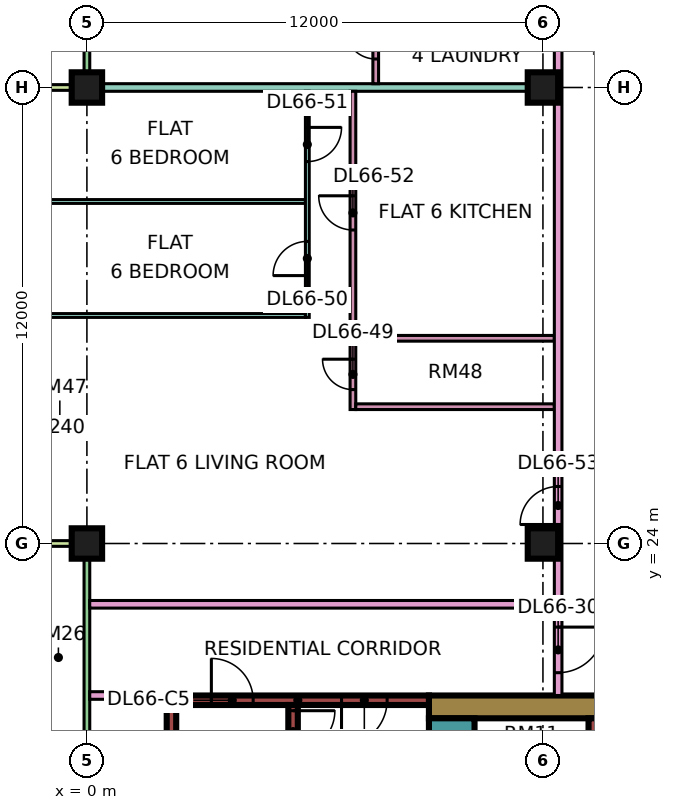
"""IFC4 building model, lengths in metres.
Left out: names, types, materials, properties, quantities, classifications, styles, units other than length and angle.
Written with IfcOpenShell. Run it as: python <this file> out.ifc"""

import sys

from ifc_helpers import new_model, si_unit, direction, frame, frame_2d, origin, origin_2d, place, context, subcontext, project, spatial, rectangle, extrude, element, fill, save


model = new_model("IFC4")
c1 = context("Model", 3, precision=1e-05, world=origin(), true_north=direction((0.0, 1.0)))
c2 = subcontext(c1, "Body", "Model", "MODEL_VIEW")
j1 = project(units=[si_unit("LENGTHUNIT", "METRE"), si_unit("PLANEANGLEUNIT", "RADIAN")], contexts=[c1])
p1 = place(None, origin())
s1 = spatial("IfcSite", under=j1, at=p1, CompositionType="ELEMENT")
p2 = place(p1, origin())
s2 = spatial("IfcBuilding", under=s1, at=p2, CompositionType="ELEMENT")
p3 = place(p2, frame((0.0, 0.0, 284.65)))
s3 = spatial("IfcBuildingStorey", under=s2, at=p3, CompositionType="ELEMENT", Elevation=284.65)
p4 = place(p3, frame((0.0, 24.0, 0.0), z_axis=(0.0, 0.0, 1.0), x_axis=(1.0, 0.0, 0.0)))
e1 = element("IfcColumn", 1, at=p4, inside=s3, PredefinedType="COLUMN", context=c2, shape_type="SweptSolid", body=[
    extrude(rectangle(XDim=0.8, YDim=0.8, at=origin_2d()), origin(), (0.0, 0.0, 1.0), 3.75),
])
p5 = place(p3, frame((0.0, 36.0, 0.0), z_axis=(0.0, 0.0, 1.0), x_axis=(1.0, 0.0, 0.0)))
e2 = element("IfcColumn", 2, at=p5, inside=s3, PredefinedType="COLUMN", context=c2, shape_type="SweptSolid", body=[
    extrude(rectangle(XDim=0.8, YDim=0.8, at=origin_2d()), origin(), (0.0, 0.0, 1.0), 3.75),
])
for number, where, z_axis, x_axis in (
    (3, (12.0, 24.0, 0.0), (0.0, 0.0, 1.0), (1.0, 0.0, 0.0)),
    (4, (12.0, 36.0, 0.0), (0.0, 0.0, 1.0), (1.0, 0.0, 0.0)),
):
    element("IfcColumn", number, at=place(p3, frame(where, z_axis=z_axis, x_axis=x_axis)), inside=s3, PredefinedType="COLUMN", context=c2, shape_type="SweptSolid", body=[
        extrude(rectangle(XDim=0.8, YDim=0.8, at=origin_2d()), origin(), (0.0, 0.0, 1.0), 3.75),
    ])
p6 = place(p3, frame((9.0, 19.7, 0.0), z_axis=(0.0, 0.0, 1.0), x_axis=(1.0, 0.0, 0.0)))
e5 = element("IfcWall", 5, at=p6, inside=s3, PredefinedType="SHEAR", context=c2, shape_type="SweptSolid", body=[
    extrude(rectangle(XDim=25.0, YDim=0.6, at=frame_2d((12.5, 0.0))), origin(), (0.0, 0.0, 1.0), 3.75),
])
p7 = place(p6, frame((19.1, 0.0, 0.0)))
e6 = element("IfcOpeningElement", 6, at=p7, cuts=e5, PredefinedType="OPENING", context=c2, shape_type="SweptSolid", body=[
    extrude(rectangle(XDim=1.8, YDim=2.4, at=frame_2d((0.9, 1.2))), frame((0.0, 0.31, 0.0), z_axis=(0.0, -1.0, 0.0), x_axis=(1.0, 0.0, 0.0)), (0.0, 0.0, 1.0), 0.62),
])
p8 = place(p3, frame((9.6, 7.6, 0.0), z_axis=(0.0, 0.0, 1.0), x_axis=(0.0, 1.0, 0.0)))
e7 = element("IfcWall", 7, at=p8, inside=s3, PredefinedType="SHEAR", context=c2, shape_type="SweptSolid", body=[
    extrude(rectangle(XDim=11.8, YDim=1.2, at=frame_2d((5.9, 0.0))), origin(), (0.0, 0.0, 1.0), 3.75),
])
p9 = place(p8, frame((4.275, 0.0, 0.0)))
e8 = element("IfcOpeningElement", 8, at=p9, cuts=e7, PredefinedType="OPENING", context=c2, shape_type="SweptSolid", body=[
    extrude(rectangle(XDim=1.1, YDim=2.2, at=frame_2d((0.55, 1.1))), frame((0.0, 0.61, 0.0), z_axis=(0.0, -1.0, 0.0), x_axis=(1.0, 0.0, 0.0)), (0.0, 0.0, 1.0), 1.22),
])
p10 = place(p8, frame((6.775, 0.0, 0.0)))
e9 = element("IfcOpeningElement", 9, at=p10, cuts=e7, PredefinedType="OPENING", context=c2, shape_type="SweptSolid", body=[
    extrude(rectangle(XDim=1.1, YDim=2.2, at=frame_2d((0.55, 1.1))), frame((0.0, 0.61, 0.0), z_axis=(0.0, -1.0, 0.0), x_axis=(1.0, 0.0, 0.0)), (0.0, 0.0, 1.0), 1.22),
])
p11 = place(p8, frame((9.7, 0.0, 0.0)))
e10 = element("IfcOpeningElement", 10, at=p11, cuts=e7, PredefinedType="OPENING", context=c2, shape_type="SweptSolid", body=[
    extrude(rectangle(XDim=1.1, YDim=2.2, at=frame_2d((0.55, 1.1))), frame((0.0, 0.61, 0.0), z_axis=(0.0, -1.0, 0.0), x_axis=(1.0, 0.0, 0.0)), (0.0, 0.0, 1.0), 1.22),
])
p12 = place(p8, frame((1.95, 0.0, 0.0)))
e11 = element("IfcOpeningElement", 11, at=p12, cuts=e7, PredefinedType="OPENING", context=c2, shape_type="SweptSolid", body=[
    extrude(rectangle(XDim=0.9, YDim=2.1, at=frame_2d((0.45, 1.05))), frame((0.0, 0.61, 0.0), z_axis=(0.0, -1.0, 0.0), x_axis=(1.0, 0.0, 0.0)), (0.0, 0.0, 1.0), 1.22),
])
p13 = place(p3, frame((13.325, 7.6, 0.0), z_axis=(0.0, 0.0, 1.0), x_axis=(0.0, 1.0, 0.0)))
e12 = element("IfcWall", 12, at=p13, inside=s3, PredefinedType="SHEAR", context=c2, shape_type="SweptSolid", body=[
    extrude(rectangle(XDim=11.8, YDim=0.25, at=frame_2d((5.9, 0.0))), origin(), (0.0, 0.0, 1.0), 3.75),
])
p14 = place(p3, frame((2.1, 19.875, 0.0), z_axis=(0.0, 0.0, 1.0), x_axis=(1.0, 0.0, 0.0)))
e13 = element("IfcWall", 13, at=p14, inside=s3, PredefinedType="SHEAR", context=c2, shape_type="SweptSolid", body=[
    extrude(rectangle(XDim=6.9, YDim=0.25, at=frame_2d((3.45, 0.0))), origin(), (0.0, 0.0, 1.0), 3.75),
])
p15 = place(p14, frame((1.175, 0.0, 0.0)))
e14 = element("IfcOpeningElement", 14, at=p15, cuts=e13, PredefinedType="OPENING", context=c2, shape_type="SweptSolid", body=[
    extrude(rectangle(XDim=1.1, YDim=2.2, at=frame_2d((0.55, 1.1))), frame((0.0, 0.135, 0.0), z_axis=(0.0, -1.0, 0.0), x_axis=(1.0, 0.0, 0.0)), (0.0, 0.0, 1.0), 0.27),
])
p16 = place(p14, frame((4.6, 0.0, 0.0)))
e15 = element("IfcOpeningElement", 15, at=p16, cuts=e13, PredefinedType="OPENING", context=c2, shape_type="SweptSolid", body=[
    extrude(rectangle(XDim=1.2, YDim=2.2, at=frame_2d((0.6, 1.1))), frame((0.0, 0.135, 0.0), z_axis=(0.0, -1.0, 0.0), x_axis=(1.0, 0.0, 0.0)), (0.0, 0.0, 1.0), 0.27),
])
p17 = place(p3, frame((2.225, 13.25, 0.0), z_axis=(0.0, 0.0, 1.0), x_axis=(0.0, 1.0, 0.0)))
e16 = element("IfcWall", 16, at=p17, inside=s3, PredefinedType="SHEAR", context=c2, shape_type="SweptSolid", body=[
    extrude(rectangle(XDim=6.5, YDim=0.25, at=frame_2d((3.25, 0.0))), origin(), (0.0, 0.0, 1.0), 3.75),
])
p18 = place(p3, frame((5.425, 13.25, 0.0), z_axis=(0.0, 0.0, 1.0), x_axis=(0.0, 1.0, 0.0)))
e17 = element("IfcWall", 17, at=p18, inside=s3, PredefinedType="SHEAR", context=c2, shape_type="SweptSolid", body=[
    extrude(rectangle(XDim=6.5, YDim=0.25, at=frame_2d((3.25, 0.0))), origin(), (0.0, 0.0, 1.0), 3.75),
])
p19 = place(p18, frame((5.25, 0.0, 0.0)))
e18 = element("IfcOpeningElement", 18, at=p19, cuts=e17, PredefinedType="OPENING", context=c2, shape_type="SweptSolid", body=[
    extrude(rectangle(XDim=1.1, YDim=2.2, at=frame_2d((0.55, 1.1))), frame((0.0, 0.135, 0.0), z_axis=(0.0, -1.0, 0.0), x_axis=(1.0, 0.0, 0.0)), (0.0, 0.0, 1.0), 0.27),
])
p20 = place(p3, frame((0.0, 47.925, 0.0), z_axis=(0.0, 0.0, 1.0), x_axis=(0.0, -1.0, 0.0)))
e19 = element("IfcWall", 19, at=p20, inside=s3, PredefinedType="SOLIDWALL", context=c2, shape_type="SweptSolid", body=[
    extrude(rectangle(XDim=11.85, YDim=0.15, at=frame_2d((5.925, 0.0))), origin(), (0.0, 0.0, 1.0), 3.35),
])
p21 = place(p20, frame((0.613, 0.0, 0.0)))
e20 = element("IfcOpeningElement", 20, at=p21, cuts=e19, PredefinedType="OPENING", context=c2, shape_type="SweptSolid", body=[
    extrude(rectangle(XDim=1.2, YDim=2.4, at=frame_2d((0.6, 1.2))), frame((0.0, 0.085, 0.0), z_axis=(0.0, -1.0, 0.0), x_axis=(1.0, 0.0, 0.0)), (0.0, 0.0, 1.0), 0.17),
])
p22 = place(p20, frame((3.775, 0.0, 0.45)))
e21 = element("IfcOpeningElement", 21, at=p22, cuts=e19, PredefinedType="OPENING", context=c2, shape_type="SweptSolid", body=[
    extrude(rectangle(XDim=1.8, YDim=2.4, at=frame_2d((0.9, 1.2))), frame((0.0, 0.085, 0.0), z_axis=(0.0, -1.0, 0.0), x_axis=(1.0, 0.0, 0.0)), (0.0, 0.0, 1.0), 0.17),
])
p23 = place(p20, frame((7.175, 0.0, 0.45)))
e22 = element("IfcOpeningElement", 22, at=p23, cuts=e19, PredefinedType="OPENING", context=c2, shape_type="SweptSolid", body=[
    extrude(rectangle(XDim=3.0, YDim=2.4, at=frame_2d((1.5, 1.2))), frame((0.0, 0.085, 0.0), z_axis=(0.0, -1.0, 0.0), x_axis=(1.0, 0.0, 0.0)), (0.0, 0.0, 1.0), 0.17),
])
p24 = place(p3, frame((-1.5, 36.0, 0.0), z_axis=(0.0, 0.0, 1.0), x_axis=(1.0, 0.0, 0.0)))
e23 = element("IfcWall", 23, at=p24, inside=s3, PredefinedType="SOLIDWALL", context=c2, shape_type="SweptSolid", body=[
    extrude(rectangle(XDim=1.5, YDim=0.15, at=frame_2d((0.75, 0.0))), origin(), (0.0, 0.0, 1.0), 3.35),
])
p25 = place(p3, frame((0.0, 23.925, 0.0), z_axis=(0.0, 0.0, 1.0), x_axis=(0.0, -1.0, 0.0)))
e24 = element("IfcWall", 24, at=p25, inside=s3, PredefinedType="SOLIDWALL", context=c2, shape_type="SweptSolid", body=[
    extrude(rectangle(XDim=11.35, YDim=0.15, at=frame_2d((5.675, 0.0))), origin(), (0.0, 0.0, 1.0), 3.35),
])
p26 = place(p25, frame((6.738, 0.0, 0.0)))
e25 = element("IfcOpeningElement", 25, at=p26, cuts=e24, PredefinedType="OPENING", context=c2, shape_type="SweptSolid", body=[
    extrude(rectangle(XDim=1.8, YDim=2.4, at=frame_2d((0.9, 1.2))), frame((0.0, 0.085, 0.0), z_axis=(0.0, -1.0, 0.0), x_axis=(1.0, 0.0, 0.0)), (0.0, 0.0, 1.0), 0.17),
])
p27 = place(p3, frame((-1.5, 24.0, 0.0), z_axis=(0.0, 0.0, 1.0), x_axis=(1.0, 0.0, 0.0)))
e26 = element("IfcWall", 26, at=p27, inside=s3, PredefinedType="SOLIDWALL", context=c2, shape_type="SweptSolid", body=[
    extrude(rectangle(XDim=1.5, YDim=0.15, at=frame_2d((0.75, 0.0))), origin(), (0.0, 0.0, 1.0), 3.35),
])
p28 = place(p3, frame((-1.351, 33.0, 0.0), z_axis=(0.0, 0.0, 1.0), x_axis=(1.0, 0.0, 0.0)))
e27 = element("IfcWall", 27, at=p28, inside=s3, PredefinedType="PARTITIONING", context=c2, shape_type="SweptSolid", body=[
    extrude(rectangle(XDim=7.101, YDim=0.1, at=frame_2d((3.551, 0.0))), origin(), (0.0, 0.0, 1.0), 3.35),
])
p29 = place(p3, frame((-1.35, 30.0, 0.0), z_axis=(0.0, 0.0, 1.0), x_axis=(1.0, 0.0, 0.0)))
e28 = element("IfcWall", 28, at=p29, inside=s3, PredefinedType="PARTITIONING", context=c2, shape_type="SweptSolid", body=[
    extrude(rectangle(XDim=7.1, YDim=0.1, at=frame_2d((3.55, 0.0))), origin(), (0.0, 0.0, 1.0), 3.35),
])
e29 = element("IfcWall", 29, at=p5, inside=s3, PredefinedType="PARTITIONING", context=c2, shape_type="SweptSolid", body=[
    extrude(rectangle(XDim=12.3, YDim=0.2, at=frame_2d((6.15, 0.0))), origin(), (0.0, 0.0, 1.0), 3.35),
])
p30 = place(p3, frame((0.074, 20.0, 0.0), z_axis=(0.0, 0.0, 1.0), x_axis=(1.0, 0.0, 0.0)))
e30 = element("IfcWall", 30, at=p30, inside=s3, PredefinedType="PARTITIONING", context=c2, shape_type="SweptSolid", body=[
    extrude(rectangle(XDim=2.026, YDim=0.2, at=frame_2d((1.013, 0.0))), origin(), (0.0, 0.0, 1.0), 3.35),
])
p31 = place(p3, frame((0.074, 22.4, 0.0), z_axis=(0.0, 0.0, 1.0), x_axis=(1.0, 0.0, 0.0)))
e31 = element("IfcWall", 31, at=p31, inside=s3, PredefinedType="PARTITIONING", context=c2, shape_type="SweptSolid", body=[
    extrude(rectangle(XDim=12.226, YDim=0.2, at=frame_2d((6.113, 0.0))), origin(), (0.0, 0.0, 1.0), 3.35),
])
p32 = place(p3, frame((5.8, 29.95, 0.0), z_axis=(0.0, 0.0, 1.0), x_axis=(0.0, 1.0, 0.0)))
e32 = element("IfcWall", 32, at=p32, inside=s3, PredefinedType="PARTITIONING", context=c2, shape_type="SweptSolid", body=[
    extrude(rectangle(XDim=5.95, YDim=0.1, at=frame_2d((2.975, 0.0))), origin(), (0.0, 0.0, 1.0), 3.35),
])
p33 = place(p32, frame((1.1, 0.0, 0.0)))
e33 = element("IfcOpeningElement", 33, at=p33, cuts=e32, PredefinedType="OPENING", context=c2, shape_type="SweptSolid", body=[
    extrude(rectangle(XDim=0.9, YDim=2.1, at=frame_2d((0.45, 1.05))), frame((0.0, 0.06, 0.0), z_axis=(0.0, -1.0, 0.0), x_axis=(1.0, 0.0, 0.0)), (0.0, 0.0, 1.0), 0.12),
])
p34 = place(p32, frame((4.1, 0.0, 0.0)))
e34 = element("IfcOpeningElement", 34, at=p34, cuts=e32, PredefinedType="OPENING", context=c2, shape_type="SweptSolid", body=[
    extrude(rectangle(XDim=0.9, YDim=2.1, at=frame_2d((0.45, 1.05))), frame((0.0, 0.06, 0.0), z_axis=(0.0, -1.0, 0.0), x_axis=(1.0, 0.0, 0.0)), (0.0, 0.0, 1.0), 0.12),
])
p35 = place(p3, frame((7.0, 27.525, 0.0), z_axis=(0.0, 0.0, 1.0), x_axis=(0.0, 1.0, 0.0)))
e35 = element("IfcWall", 35, at=p35, inside=s3, PredefinedType="PARTITIONING", context=c2, shape_type="SweptSolid", body=[
    extrude(rectangle(XDim=8.375, YDim=0.15, at=frame_2d((4.188, 0.0))), origin(), (0.0, 0.0, 1.0), 3.35),
])
p36 = place(p35, frame((0.525, 0.0, 0.0)))
e36 = element("IfcOpeningElement", 36, at=p36, cuts=e35, PredefinedType="OPENING", context=c2, shape_type="SweptSolid", body=[
    extrude(rectangle(XDim=0.8, YDim=2.1, at=frame_2d((0.4, 1.05))), frame((0.0, 0.085, 0.0), z_axis=(0.0, -1.0, 0.0), x_axis=(1.0, 0.0, 0.0)), (0.0, 0.0, 1.0), 0.17),
])
p37 = place(p35, frame((4.725, 0.0, 0.0)))
e37 = element("IfcOpeningElement", 37, at=p37, cuts=e35, PredefinedType="OPENING", context=c2, shape_type="SweptSolid", body=[
    extrude(rectangle(XDim=0.9, YDim=2.1, at=frame_2d((0.45, 1.05))), frame((0.0, 0.085, 0.0), z_axis=(0.0, -1.0, 0.0), x_axis=(1.0, 0.0, 0.0)), (0.0, 0.0, 1.0), 0.17),
])
for number, where, z_axis, x_axis in (
    (38, (7.075, 27.6, 0.0), (0.0, 0.0, 1.0), (1.0, 0.0, 0.0)),
    (39, (7.075, 29.4, 0.0), (0.0, 0.0, 1.0), (1.0, 0.0, 0.0)),
):
    element("IfcWall", number, at=place(p3, frame(where, z_axis=z_axis, x_axis=x_axis)), inside=s3, PredefinedType="PARTITIONING", context=c2, shape_type="SweptSolid", body=[
        extrude(rectangle(XDim=5.225, YDim=0.15, at=frame_2d((2.613, 0.0))), origin(), (0.0, 0.0, 1.0), 3.35),
    ])
p38 = place(p3, frame((7.6, 36.1, 0.0), z_axis=(0.0, 0.0, 1.0), x_axis=(0.0, 1.0, 0.0)))
e40 = element("IfcWall", 40, at=p38, inside=s3, PredefinedType="PARTITIONING", context=c2, shape_type="SweptSolid", body=[
    extrude(rectangle(XDim=9.25, YDim=0.15, at=frame_2d((4.625, 0.0))), origin(), (0.0, 0.0, 1.0), 3.35),
])
p39 = place(p38, frame((5.3, 0.0, 0.0)))
e41 = element("IfcOpeningElement", 41, at=p39, cuts=e40, PredefinedType="OPENING", context=c2, shape_type="SweptSolid", body=[
    extrude(rectangle(XDim=0.9, YDim=2.1, at=frame_2d((0.45, 1.05))), frame((0.0, 0.085, 0.0), z_axis=(0.0, -1.0, 0.0), x_axis=(1.0, 0.0, 0.0)), (0.0, 0.0, 1.0), 0.17),
])
p40 = place(p38, frame((0.65, 0.0, 0.0)))
e42 = element("IfcOpeningElement", 42, at=p40, cuts=e40, PredefinedType="OPENING", context=c2, shape_type="SweptSolid", body=[
    extrude(rectangle(XDim=0.8, YDim=2.1, at=frame_2d((0.4, 1.05))), frame((0.0, 0.085, 0.0), z_axis=(0.0, -1.0, 0.0), x_axis=(1.0, 0.0, 0.0)), (0.0, 0.0, 1.0), 0.17),
])
p41 = place(p3, frame((12.4, 20.0, 0.0), z_axis=(0.0, 0.0, 1.0), x_axis=(0.0, 1.0, 0.0)))
e43 = element("IfcWall", 43, at=p41, inside=s3, PredefinedType="PARTITIONING", context=c2, shape_type="SweptSolid", body=[
    extrude(rectangle(XDim=33.926, YDim=0.2, at=frame_2d((16.963, 0.0))), origin(), (0.0, 0.0, 1.0), 3.35),
])
p42 = place(p41, frame((25.8, 0.0, 0.0)))
e44 = element("IfcOpeningElement", 44, at=p42, cuts=e43, PredefinedType="OPENING", context=c2, shape_type="SweptSolid", body=[
    extrude(rectangle(XDim=1.0, YDim=2.1, at=frame_2d((0.5, 1.05))), frame((0.0, 0.11, 0.0), z_axis=(0.0, -1.0, 0.0), x_axis=(1.0, 0.0, 0.0)), (0.0, 0.0, 1.0), 0.22),
])
p43 = place(p41, frame((0.6, 0.0, 0.0)))
e45 = element("IfcOpeningElement", 45, at=p43, cuts=e43, PredefinedType="OPENING", context=c2, shape_type="SweptSolid", body=[
    extrude(rectangle(XDim=1.2, YDim=2.1, at=frame_2d((0.6, 1.05))), frame((0.0, 0.11, 0.0), z_axis=(0.0, -1.0, 0.0), x_axis=(1.0, 0.0, 0.0)), (0.0, 0.0, 1.0), 0.22),
])
p44 = place(p41, frame((4.5, 0.0, 0.0)))
e46 = element("IfcOpeningElement", 46, at=p44, cuts=e43, PredefinedType="OPENING", context=c2, shape_type="SweptSolid", body=[
    extrude(rectangle(XDim=1.0, YDim=2.1, at=frame_2d((0.5, 1.05))), frame((0.0, 0.11, 0.0), z_axis=(0.0, -1.0, 0.0), x_axis=(1.0, 0.0, 0.0)), (0.0, 0.0, 1.0), 0.22),
])
p45 = place(p19, origin())
e47 = element("IfcDoor", 47, at=p45, inside=s3, OperationType="SINGLE_SWING_RIGHT", PredefinedType="DOOR", context=c2, shape_type="SweptSolid", body=[
    extrude(rectangle(XDim=1.1, YDim=2.2, at=frame_2d((0.55, 1.1))), frame((0.0, 0.025, 0.0), z_axis=(0.0, -1.0, 0.0), x_axis=(1.0, 0.0, 0.0)), (0.0, 0.0, 1.0), 0.05),
])
fill(e18, e47)
p46 = place(p15, origin())
e48 = element("IfcDoor", 48, at=p46, inside=s3, OperationType="SINGLE_SWING_LEFT", PredefinedType="DOOR", context=c2, shape_type="SweptSolid", body=[
    extrude(rectangle(XDim=1.1, YDim=2.2, at=frame_2d((0.55, 1.1))), frame((0.0, 0.025, 0.0), z_axis=(0.0, -1.0, 0.0), x_axis=(1.0, 0.0, 0.0)), (0.0, 0.0, 1.0), 0.05),
])
fill(e14, e48)
p47 = place(p16, frame((1.2, 0.0, 0.0), z_axis=(0.0, 0.0, 1.0), x_axis=(-1.0, 0.0, 0.0)))
e49 = element("IfcDoor", 49, at=p47, inside=s3, OperationType="SINGLE_SWING_LEFT", PredefinedType="DOOR", context=c2, shape_type="SweptSolid", body=[
    extrude(rectangle(XDim=1.2, YDim=2.2, at=frame_2d((0.6, 1.1))), frame((0.0, 0.025, 0.0), z_axis=(0.0, -1.0, 0.0), x_axis=(1.0, 0.0, 0.0)), (0.0, 0.0, 1.0), 0.05),
])
fill(e15, e49)
p48 = place(p40, frame((0.8, 0.0, 0.0), z_axis=(0.0, 0.0, 1.0), x_axis=(-1.0, 0.0, 0.0)))
e50 = element("IfcDoor", 50, at=p48, inside=s3, OperationType="SINGLE_SWING_RIGHT", PredefinedType="DOOR", context=c2, shape_type="SweptSolid", body=[
    extrude(rectangle(XDim=0.8, YDim=2.1, at=frame_2d((0.4, 1.05))), frame((0.0, 0.025, 0.0), z_axis=(0.0, -1.0, 0.0), x_axis=(1.0, 0.0, 0.0)), (0.0, 0.0, 1.0), 0.05),
])
fill(e42, e50)
p49 = place(p43, origin())
e51 = element("IfcDoor", 51, at=p49, inside=s3, OperationType="SINGLE_SWING_RIGHT", PredefinedType="DOOR", context=c2, shape_type="SweptSolid", body=[
    extrude(rectangle(XDim=1.2, YDim=2.1, at=frame_2d((0.6, 1.05))), frame((0.0, 0.025, 0.0), z_axis=(0.0, -1.0, 0.0), x_axis=(1.0, 0.0, 0.0)), (0.0, 0.0, 1.0), 0.05),
])
fill(e45, e51)
p50 = place(p36, frame((0.8, 0.0, 0.0), z_axis=(0.0, 0.0, 1.0), x_axis=(-1.0, 0.0, 0.0)))
e52 = element("IfcDoor", 52, at=p50, inside=s3, OperationType="SINGLE_SWING_RIGHT", PredefinedType="DOOR", context=c2, shape_type="SweptSolid", body=[
    extrude(rectangle(XDim=0.8, YDim=2.1, at=frame_2d((0.4, 1.05))), frame((0.0, 0.025, 0.0), z_axis=(0.0, -1.0, 0.0), x_axis=(1.0, 0.0, 0.0)), (0.0, 0.0, 1.0), 0.05),
])
fill(e36, e52)
p51 = place(p33, origin())
e53 = element("IfcDoor", 53, at=p51, inside=s3, OperationType="SINGLE_SWING_LEFT", PredefinedType="DOOR", context=c2, shape_type="SweptSolid", body=[
    extrude(rectangle(XDim=0.9, YDim=2.1, at=frame_2d((0.45, 1.05))), frame((0.0, 0.025, 0.0), z_axis=(0.0, -1.0, 0.0), x_axis=(1.0, 0.0, 0.0)), (0.0, 0.0, 1.0), 0.05),
])
fill(e33, e53)
p52 = place(p34, origin())
e54 = element("IfcDoor", 54, at=p52, inside=s3, OperationType="SINGLE_SWING_RIGHT", PredefinedType="DOOR", context=c2, shape_type="SweptSolid", body=[
    extrude(rectangle(XDim=0.9, YDim=2.1, at=frame_2d((0.45, 1.05))), frame((0.0, 0.025, 0.0), z_axis=(0.0, -1.0, 0.0), x_axis=(1.0, 0.0, 0.0)), (0.0, 0.0, 1.0), 0.05),
])
fill(e34, e54)
p53 = place(p37, frame((0.9, 0.0, 0.0), z_axis=(0.0, 0.0, 1.0), x_axis=(-1.0, 0.0, 0.0)))
e55 = element("IfcDoor", 55, at=p53, inside=s3, OperationType="SINGLE_SWING_RIGHT", PredefinedType="DOOR", context=c2, shape_type="SweptSolid", body=[
    extrude(rectangle(XDim=0.9, YDim=2.1, at=frame_2d((0.45, 1.05))), frame((0.0, 0.025, 0.0), z_axis=(0.0, -1.0, 0.0), x_axis=(1.0, 0.0, 0.0)), (0.0, 0.0, 1.0), 0.05),
])
fill(e37, e55)
p54 = place(p44, origin())
e56 = element("IfcDoor", 56, at=p54, inside=s3, OperationType="SINGLE_SWING_LEFT", PredefinedType="DOOR", context=c2, shape_type="SweptSolid", body=[
    extrude(rectangle(XDim=1.0, YDim=2.1, at=frame_2d((0.5, 1.05))), frame((0.0, 0.025, 0.0), z_axis=(0.0, -1.0, 0.0), x_axis=(1.0, 0.0, 0.0)), (0.0, 0.0, 1.0), 0.05),
])
fill(e46, e56)
save(model, sys.argv[1])
